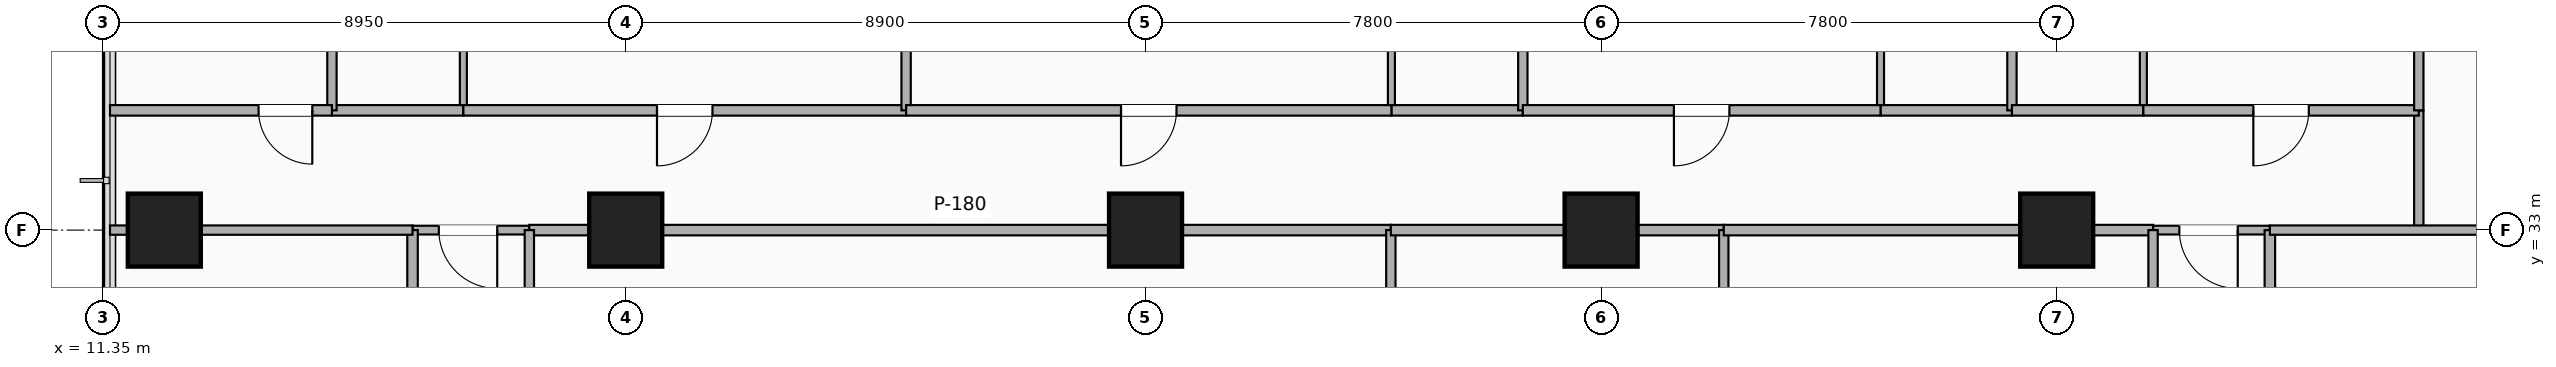
"""IFC4 building model, lengths in metres.
Left out: names, types, materials, properties, quantities, classifications, styles, units other than length and angle.
Written with IfcOpenShell. Run it as: python <this file> out.ifc"""

import sys

from ifc_helpers import new_model, si_unit, direction, frame, frame_2d, origin, origin_2d, place, context, subcontext, project, spatial, rectangle, extrude, element, fill, save


model = new_model("IFC4")
c1 = context("Model", 3, precision=1e-05, world=origin(), true_north=direction((0.0, 1.0)))
c2 = subcontext(c1, "Body", "Model", "MODEL_VIEW")
j1 = project(units=[si_unit("LENGTHUNIT", "METRE"), si_unit("PLANEANGLEUNIT", "RADIAN")], contexts=[c1])
p1 = place(None, origin())
s1 = spatial("IfcSite", under=j1, at=p1, CompositionType="ELEMENT")
p2 = place(p1, origin())
s2 = spatial("IfcBuilding", under=s1, at=p2, CompositionType="ELEMENT")
p3 = place(p2, frame((0.0, 0.0, 98.7)))
s3 = spatial("IfcBuildingStorey", under=s2, at=p3, CompositionType="ELEMENT", Elevation=98.7)
for number, where, z_axis, x_axis in (
    (1, (20.3, 33.0, -0.26), (0.0, 0.0, 1.0), (1.0, 0.0, 0.0)),
    (2, (29.2, 33.0, -0.26), (0.0, 0.0, 1.0), (1.0, 0.0, 0.0)),
    (3, (37.0, 33.0, -0.26), (0.0, 0.0, 1.0), (1.0, 0.0, 0.0)),
    (4, (44.8, 33.0, -0.26), (0.0, 0.0, 1.0), (1.0, 0.0, 0.0)),
    (5, (12.4, 33.0, -0.26), (0.0, 0.0, 1.0), (1.0, 0.0, 0.0)),
):
    element("IfcColumn", number, at=place(p3, frame(where, z_axis=z_axis, x_axis=x_axis)), inside=s3, PredefinedType="COLUMN", context=c2, shape_type="SweptSolid", body=[
        extrude(rectangle(XDim=1.25, YDim=1.25, at=origin_2d()), origin(), (0.0, 0.0, 1.0), 3.5),
    ])
p4 = place(p3, frame((16.65, 33.0, 0.0), z_axis=(0.0, 0.0, 1.0), x_axis=(1.0, 0.0, 0.0)))
e6 = element("IfcWall", 6, at=p4, inside=s3, PredefinedType="PARTITIONING", context=c2, shape_type="SweptSolid", body=[
    extrude(rectangle(XDim=2.0, YDim=0.15, at=frame_2d((1.0, 0.0))), origin(), (0.0, 0.0, 1.0), 2.313),
])
p5 = place(p4, frame((0.45, 0.0, 0.0)))
e7 = element("IfcOpeningElement", 7, at=p5, cuts=e6, PredefinedType="OPENING", context=c2, shape_type="SweptSolid", body=[
    extrude(rectangle(XDim=1.0, YDim=2.15, at=frame_2d((0.5, 1.075))), frame((0.0, 0.085, 0.0), z_axis=(0.0, -1.0, 0.0), x_axis=(1.0, 0.0, 0.0)), (0.0, 0.0, 1.0), 0.17),
])
p6 = place(p3, frame((46.45, 33.0, 0.0), z_axis=(0.0, 0.0, 1.0), x_axis=(1.0, 0.0, 0.0)))
e8 = element("IfcWall", 8, at=p6, inside=s3, PredefinedType="PARTITIONING", context=c2, shape_type="SweptSolid", body=[
    extrude(rectangle(XDim=2.0, YDim=0.15, at=frame_2d((1.0, 0.0))), origin(), (0.0, 0.0, 1.0), 2.313),
])
p7 = place(p6, frame((0.45, 0.0, 0.0)))
e9 = element("IfcOpeningElement", 9, at=p7, cuts=e8, PredefinedType="OPENING", context=c2, shape_type="SweptSolid", body=[
    extrude(rectangle(XDim=1.0, YDim=2.15, at=frame_2d((0.5, 1.075))), frame((0.0, 0.085, 0.0), z_axis=(0.0, -1.0, 0.0), x_axis=(1.0, 0.0, 0.0)), (0.0, 0.0, 1.0), 0.17),
])
p8 = place(p3, frame((51.0, 33.0, 0.0), z_axis=(0.0, 0.0, 1.0), x_axis=(0.0, 1.0, 0.0)))
e10 = element("IfcWall", 10, at=p8, inside=s3, PredefinedType="PARTITIONING", context=c2, shape_type="SweptSolid", body=[
    extrude(rectangle(XDim=2.05, YDim=0.16, at=frame_2d((1.025, 0.0))), origin(), (0.0, 0.0, 1.0), 2.313),
])
p9 = place(p3, frame((18.65, 33.0, 0.0), z_axis=(0.0, 0.0, 1.0), x_axis=(1.0, 0.0, 0.0)))
e11 = element("IfcWall", 11, at=p9, inside=s3, PredefinedType="PARTITIONING", context=c2, shape_type="SweptSolid", body=[
    extrude(rectangle(XDim=14.75, YDim=0.18, at=frame_2d((7.375, 0.0))), origin(), (0.0, 0.0, 1.0), 2.313),
])
p10 = place(p3, frame((18.65, 22.65, 0.0), z_axis=(0.0, 0.0, 1.0), x_axis=(0.0, 1.0, 0.0)))
e12 = element("IfcWall", 12, at=p10, inside=s3, PredefinedType="PARTITIONING", context=c2, shape_type="SweptSolid", body=[
    extrude(rectangle(XDim=10.35, YDim=0.16, at=frame_2d((5.175, 0.0))), origin(), (0.0, 0.0, 1.0), 2.313),
])
p11 = place(p3, frame((33.4, 22.65, 0.0), z_axis=(0.0, 0.0, 1.0), x_axis=(0.0, 1.0, 0.0)))
e13 = element("IfcWall", 13, at=p11, inside=s3, PredefinedType="PARTITIONING", context=c2, shape_type="SweptSolid", body=[
    extrude(rectangle(XDim=10.35, YDim=0.16, at=frame_2d((5.175, 0.0))), origin(), (0.0, 0.0, 1.0), 2.614),
])
p12 = place(p3, frame((33.4, 33.0, 0.0), z_axis=(0.0, 0.0, 1.0), x_axis=(1.0, 0.0, 0.0)))
e14 = element("IfcWall", 14, at=p12, inside=s3, PredefinedType="PARTITIONING", context=c2, shape_type="SweptSolid", body=[
    extrude(rectangle(XDim=5.7, YDim=0.18, at=frame_2d((2.85, 0.0))), origin(), (0.0, 0.0, 1.0), 2.313),
])
p13 = place(p3, frame((39.1, 22.65, 0.0), z_axis=(0.0, 0.0, 1.0), x_axis=(0.0, 1.0, 0.0)))
e15 = element("IfcWall", 15, at=p13, inside=s3, PredefinedType="PARTITIONING", context=c2, shape_type="SweptSolid", body=[
    extrude(rectangle(XDim=10.35, YDim=0.16, at=frame_2d((5.175, 0.0))), origin(), (0.0, 0.0, 1.0), 2.614),
])
p14 = place(p3, frame((39.1, 33.0, 0.0), z_axis=(0.0, 0.0, 1.0), x_axis=(1.0, 0.0, 0.0)))
e16 = element("IfcWall", 16, at=p14, inside=s3, PredefinedType="PARTITIONING", context=c2, shape_type="SweptSolid", body=[
    extrude(rectangle(XDim=7.35, YDim=0.18, at=frame_2d((3.675, 0.0))), origin(), (0.0, 0.0, 1.0), 2.313),
])
p15 = place(p3, frame((46.45, 22.65, 0.0), z_axis=(0.0, 0.0, 1.0), x_axis=(0.0, 1.0, 0.0)))
e17 = element("IfcWall", 17, at=p15, inside=s3, PredefinedType="PARTITIONING", context=c2, shape_type="SweptSolid", body=[
    extrude(rectangle(XDim=10.35, YDim=0.16, at=frame_2d((5.175, 0.0))), origin(), (0.0, 0.0, 1.0), 2.313),
])
p16 = place(p3, frame((17.52, 35.05, 0.0), z_axis=(0.0, 0.0, 1.0), x_axis=(0.0, 1.0, 0.0)))
e18 = element("IfcWall", 18, at=p16, inside=s3, PredefinedType="PARTITIONING", context=c2, shape_type="SweptSolid", body=[
    extrude(rectangle(XDim=2.35, YDim=0.12, at=frame_2d((1.175, 0.0))), origin(), (0.0, 0.0, 1.0), 3.24),
])
p17 = place(p3, frame((15.27, 35.05, 0.0), z_axis=(0.0, 0.0, 1.0), x_axis=(1.0, 0.0, 0.0)))
e19 = element("IfcWall", 19, at=p17, inside=s3, PredefinedType="PARTITIONING", context=c2, shape_type="SweptSolid", body=[
    extrude(rectangle(XDim=2.25, YDim=0.18, at=frame_2d((1.125, 0.0))), origin(), (0.0, 0.0, 1.0), 3.24),
])
p18 = place(p3, frame((17.52, 35.05, 0.0), z_axis=(0.0, 0.0, 1.0), x_axis=(1.0, 0.0, 0.0)))
e20 = element("IfcWall", 20, at=p18, inside=s3, PredefinedType="PARTITIONING", context=c2, shape_type="SweptSolid", body=[
    extrude(rectangle(XDim=7.581, YDim=0.18, at=frame_2d((3.79, 0.0))), origin(), (0.0, 0.0, 1.0), 2.313),
])
p19 = place(p18, frame((3.315, 0.0, 0.0)))
e21 = element("IfcOpeningElement", 21, at=p19, cuts=e20, PredefinedType="OPENING", context=c2, shape_type="SweptSolid", body=[
    extrude(rectangle(XDim=0.95, YDim=2.15, at=frame_2d((0.475, 1.075))), frame((0.0, 0.1, 0.0), z_axis=(0.0, -1.0, 0.0), x_axis=(1.0, 0.0, 0.0)), (0.0, 0.0, 1.0), 0.2),
])
p20 = place(p3, frame((15.27, 35.05, 0.0), z_axis=(0.0, 0.0, 1.0), x_axis=(0.0, 1.0, 0.0)))
e22 = element("IfcWall", 22, at=p20, inside=s3, PredefinedType="PARTITIONING", context=c2, shape_type="SweptSolid", body=[
    extrude(rectangle(XDim=7.53, YDim=0.16, at=frame_2d((3.765, 0.0))), origin(), (0.0, 0.0, 1.0), 3.24),
])
p21 = place(p3, frame((25.101, 35.05, 0.0), z_axis=(0.0, 0.0, 1.0), x_axis=(0.0, 1.0, 0.0)))
e23 = element("IfcWall", 23, at=p21, inside=s3, PredefinedType="PARTITIONING", context=c2, shape_type="SweptSolid", body=[
    extrude(rectangle(XDim=11.33, YDim=0.16, at=frame_2d((5.665, 0.0))), origin(), (0.0, 0.0, 1.0), 2.603),
])
p22 = place(p3, frame((33.41, 35.05, 0.0), z_axis=(0.0, 0.0, 1.0), x_axis=(0.0, 1.0, 0.0)))
e24 = element("IfcWall", 24, at=p22, inside=s3, PredefinedType="PARTITIONING", context=c2, shape_type="SweptSolid", body=[
    extrude(rectangle(XDim=2.35, YDim=0.12, at=frame_2d((1.175, 0.0))), origin(), (0.0, 0.0, 1.0), 2.922),
])
p23 = place(p3, frame((33.41, 35.05, 0.0), z_axis=(0.0, 0.0, 1.0), x_axis=(1.0, 0.0, 0.0)))
e25 = element("IfcWall", 25, at=p23, inside=s3, PredefinedType="PARTITIONING", context=c2, shape_type="SweptSolid", body=[
    extrude(rectangle(XDim=2.25, YDim=0.18, at=frame_2d((1.125, 0.0))), origin(), (0.0, 0.0, 1.0), 3.24),
])
p24 = place(p3, frame((25.101, 35.05, 0.0), z_axis=(0.0, 0.0, 1.0), x_axis=(1.0, 0.0, 0.0)))
e26 = element("IfcWall", 26, at=p24, inside=s3, PredefinedType="PARTITIONING", context=c2, shape_type="SweptSolid", body=[
    extrude(rectangle(XDim=8.309, YDim=0.18, at=frame_2d((4.155, 0.0))), origin(), (0.0, 0.0, 1.0), 2.313),
])
p25 = place(p24, frame((3.679, 0.0, 0.0)))
e27 = element("IfcOpeningElement", 27, at=p25, cuts=e26, PredefinedType="OPENING", context=c2, shape_type="SweptSolid", body=[
    extrude(rectangle(XDim=0.95, YDim=2.15, at=frame_2d((0.475, 1.075))), frame((0.0, 0.1, 0.0), z_axis=(0.0, -1.0, 0.0), x_axis=(1.0, 0.0, 0.0)), (0.0, 0.0, 1.0), 0.2),
])
p26 = place(p3, frame((35.66, 35.05, 0.0), z_axis=(0.0, 0.0, 1.0), x_axis=(0.0, 1.0, 0.0)))
e28 = element("IfcWall", 28, at=p26, inside=s3, PredefinedType="PARTITIONING", context=c2, shape_type="SweptSolid", body=[
    extrude(rectangle(XDim=11.33, YDim=0.16, at=frame_2d((5.665, 0.0))), origin(), (0.0, 0.0, 1.0), 2.603),
])
p27 = place(p3, frame((41.784, 35.05, 0.0), z_axis=(0.0, 0.0, 1.0), x_axis=(0.0, 1.0, 0.0)))
e29 = element("IfcWall", 29, at=p27, inside=s3, PredefinedType="PARTITIONING", context=c2, shape_type="SweptSolid", body=[
    extrude(rectangle(XDim=2.35, YDim=0.12, at=frame_2d((1.175, 0.0))), origin(), (0.0, 0.0, 1.0), 2.922),
])
p28 = place(p3, frame((41.784, 35.05, 0.0), z_axis=(0.0, 0.0, 1.0), x_axis=(1.0, 0.0, 0.0)))
e30 = element("IfcWall", 30, at=p28, inside=s3, PredefinedType="PARTITIONING", context=c2, shape_type="SweptSolid", body=[
    extrude(rectangle(XDim=2.25, YDim=0.18, at=frame_2d((1.125, 0.0))), origin(), (0.0, 0.0, 1.0), 3.24),
])
p29 = place(p3, frame((35.66, 35.05, 0.0), z_axis=(0.0, 0.0, 1.0), x_axis=(1.0, 0.0, 0.0)))
e31 = element("IfcWall", 31, at=p29, inside=s3, PredefinedType="PARTITIONING", context=c2, shape_type="SweptSolid", body=[
    extrude(rectangle(XDim=6.124, YDim=0.18, at=frame_2d((3.062, 0.0))), origin(), (0.0, 0.0, 1.0), 2.313),
])
p30 = place(p29, frame((2.587, 0.0, 0.0)))
e32 = element("IfcOpeningElement", 32, at=p30, cuts=e31, PredefinedType="OPENING", context=c2, shape_type="SweptSolid", body=[
    extrude(rectangle(XDim=0.95, YDim=2.15, at=frame_2d((0.475, 1.075))), frame((0.0, 0.1, 0.0), z_axis=(0.0, -1.0, 0.0), x_axis=(1.0, 0.0, 0.0)), (0.0, 0.0, 1.0), 0.2),
])
p31 = place(p3, frame((44.034, 35.05, 0.0), z_axis=(0.0, 0.0, 1.0), x_axis=(0.0, 1.0, 0.0)))
e33 = element("IfcWall", 33, at=p31, inside=s3, PredefinedType="PARTITIONING", context=c2, shape_type="SweptSolid", body=[
    extrude(rectangle(XDim=11.33, YDim=0.16, at=frame_2d((5.665, 0.0))), origin(), (0.0, 0.0, 1.0), 2.603),
])
p32 = place(p3, frame((46.284, 35.05, 0.0), z_axis=(0.0, 0.0, 1.0), x_axis=(0.0, 1.0, 0.0)))
e34 = element("IfcWall", 34, at=p32, inside=s3, PredefinedType="PARTITIONING", context=c2, shape_type="SweptSolid", body=[
    extrude(rectangle(XDim=2.35, YDim=0.12, at=frame_2d((1.175, 0.0))), origin(), (0.0, 0.0, 1.0), 3.24),
])
p33 = place(p3, frame((44.034, 35.05, 0.0), z_axis=(0.0, 0.0, 1.0), x_axis=(1.0, 0.0, 0.0)))
e35 = element("IfcWall", 35, at=p33, inside=s3, PredefinedType="PARTITIONING", context=c2, shape_type="SweptSolid", body=[
    extrude(rectangle(XDim=2.25, YDim=0.18, at=frame_2d((1.125, 0.0))), origin(), (0.0, 0.0, 1.0), 2.313),
])
p34 = place(p3, frame((46.284, 35.05, 0.0), z_axis=(0.0, 0.0, 1.0), x_axis=(1.0, 0.0, 0.0)))
e36 = element("IfcWall", 36, at=p34, inside=s3, PredefinedType="PARTITIONING", context=c2, shape_type="SweptSolid", body=[
    extrude(rectangle(XDim=4.716, YDim=0.18, at=frame_2d((2.358, 0.0))), origin(), (0.0, 0.0, 1.0), 3.24),
])
p35 = place(p34, frame((1.883, 0.0, 0.0)))
e37 = element("IfcOpeningElement", 37, at=p35, cuts=e36, PredefinedType="OPENING", context=c2, shape_type="SweptSolid", body=[
    extrude(rectangle(XDim=0.95, YDim=2.15, at=frame_2d((0.475, 1.075))), frame((0.0, 0.1, 0.0), z_axis=(0.0, -1.0, 0.0), x_axis=(1.0, 0.0, 0.0)), (0.0, 0.0, 1.0), 0.2),
])
p36 = place(p3, frame((51.0, 35.05, 0.0), z_axis=(0.0, 0.0, 1.0), x_axis=(0.0, 1.0, 0.0)))
e38 = element("IfcWall", 38, at=p36, inside=s3, PredefinedType="PARTITIONING", context=c2, shape_type="SweptSolid", body=[
    extrude(rectangle(XDim=11.33, YDim=0.16, at=frame_2d((5.665, 0.0))), origin(), (0.0, 0.0, 1.0), 3.24),
])
p37 = place(p3, frame((16.65, 29.22, 0.0), z_axis=(0.0, 0.0, 1.0), x_axis=(0.0, 1.0, 0.0)))
e39 = element("IfcWall", 39, at=p37, inside=s3, PredefinedType="PARTITIONING", context=c2, shape_type="SweptSolid", body=[
    extrude(rectangle(XDim=3.78, YDim=0.18, at=frame_2d((1.89, 0.0))), origin(), (0.0, 0.0, 1.0), 2.313),
])
p38 = place(p37, frame((1.415, 0.0, 0.0)))
e40 = element("IfcOpeningElement", 40, at=p38, cuts=e39, PredefinedType="OPENING", context=c2, shape_type="SweptSolid", body=[
    extrude(rectangle(XDim=0.95, YDim=2.15, at=frame_2d((0.475, 1.075))), frame((0.0, 0.1, 0.0), z_axis=(0.0, -1.0, 0.0), x_axis=(1.0, 0.0, 0.0)), (0.0, 0.0, 1.0), 0.2),
])
p39 = place(p3, frame((11.47, 33.0, 0.0), z_axis=(0.0, 0.0, 1.0), x_axis=(1.0, 0.0, 0.0)))
e41 = element("IfcWall", 41, at=p39, inside=s3, PredefinedType="PARTITIONING", context=c2, shape_type="SweptSolid", body=[
    extrude(rectangle(XDim=5.18, YDim=0.16, at=frame_2d((2.59, 0.0))), origin(), (0.0, 0.0, 1.0), 2.313),
])
p40 = place(p3, frame((48.45, 25.55, 0.0), z_axis=(0.0, 0.0, 1.0), x_axis=(0.0, 1.0, 0.0)))
e42 = element("IfcWall", 42, at=p40, inside=s3, PredefinedType="PARTITIONING", context=c2, shape_type="SweptSolid", body=[
    extrude(rectangle(XDim=7.45, YDim=0.18, at=frame_2d((3.725, 0.0))), origin(), (0.0, 0.0, 1.0), 2.313),
])
p41 = place(p40, frame((4.2, 0.0, 0.0), z_axis=(0.0, 0.0, 1.0), x_axis=(-1.0, 0.0, 0.0)))
e43 = element("IfcOpeningElement", 43, at=p41, cuts=e42, PredefinedType="OPENING", context=c2, shape_type="SweptSolid", body=[
    extrude(rectangle(XDim=0.95, YDim=2.15, at=frame_2d((0.475, 1.075))), frame((0.0, 0.1, 0.0), z_axis=(0.0, -1.0, 0.0), x_axis=(1.0, 0.0, 0.0)), (0.0, 0.0, 1.0), 0.2),
])
p42 = place(p3, frame((48.45, 33.0, 0.0), z_axis=(0.0, 0.0, 1.0), x_axis=(1.0, 0.0, 0.0)))
e44 = element("IfcWall", 44, at=p42, inside=s3, PredefinedType="PARTITIONING", context=c2, shape_type="SweptSolid", body=[
    extrude(rectangle(XDim=10.43, YDim=0.16, at=frame_2d((5.215, 0.0))), origin(), (0.0, 0.0, 1.0), 2.313),
])
p43 = place(p3, frame((11.47, 35.05, 0.0), z_axis=(0.0, 0.0, 1.0), x_axis=(1.0, 0.0, 0.0)))
e45 = element("IfcWall", 45, at=p43, inside=s3, PredefinedType="PARTITIONING", context=c2, shape_type="SweptSolid", body=[
    extrude(rectangle(XDim=3.8, YDim=0.18, at=frame_2d((1.9, 0.0))), origin(), (0.0, 0.0, 1.0), 3.24),
])
p44 = place(p43, frame((2.544, 0.0, 0.0)))
e46 = element("IfcOpeningElement", 46, at=p44, cuts=e45, PredefinedType="OPENING", context=c2, shape_type="SweptSolid", body=[
    extrude(rectangle(XDim=0.92, YDim=2.08, at=frame_2d((0.46, 1.04))), frame((0.0, 0.1, 0.0), z_axis=(0.0, -1.0, 0.0), x_axis=(1.0, 0.0, 0.0)), (0.0, 0.0, 1.0), 0.2),
])
p45 = place(p5, origin())
e47 = element("IfcDoor", 47, at=p45, inside=s3, OperationType="SINGLE_SWING_RIGHT", PredefinedType="DOOR", context=c2, shape_type="SweptSolid", body=[
    extrude(rectangle(XDim=1.0, YDim=2.15, at=frame_2d((0.5, 1.075))), frame((0.0, 0.025, 0.0), z_axis=(0.0, -1.0, 0.0), x_axis=(1.0, 0.0, 0.0)), (0.0, 0.0, 1.0), 0.05),
])
fill(e7, e47)
p46 = place(p7, origin())
e48 = element("IfcDoor", 48, at=p46, inside=s3, OperationType="SINGLE_SWING_RIGHT", PredefinedType="DOOR", context=c2, shape_type="SweptSolid", body=[
    extrude(rectangle(XDim=1.0, YDim=2.15, at=frame_2d((0.5, 1.075))), frame((0.0, 0.025, 0.0), z_axis=(0.0, -1.0, 0.0), x_axis=(1.0, 0.0, 0.0)), (0.0, 0.0, 1.0), 0.05),
])
fill(e9, e48)
p47 = place(p19, origin())
e49 = element("IfcDoor", 49, at=p47, inside=s3, OperationType="SINGLE_SWING_LEFT", PredefinedType="DOOR", context=c2, shape_type="SweptSolid", body=[
    extrude(rectangle(XDim=0.95, YDim=2.15, at=frame_2d((0.475, 1.075))), frame((0.0, 0.025, 0.0), z_axis=(0.0, -1.0, 0.0), x_axis=(1.0, 0.0, 0.0)), (0.0, 0.0, 1.0), 0.05),
])
fill(e21, e49)
p48 = place(p25, origin())
e50 = element("IfcDoor", 50, at=p48, inside=s3, OperationType="SINGLE_SWING_LEFT", PredefinedType="DOOR", context=c2, shape_type="SweptSolid", body=[
    extrude(rectangle(XDim=0.95, YDim=2.15, at=frame_2d((0.475, 1.075))), frame((0.0, 0.025, 0.0), z_axis=(0.0, -1.0, 0.0), x_axis=(1.0, 0.0, 0.0)), (0.0, 0.0, 1.0), 0.05),
])
fill(e27, e50)
p49 = place(p30, origin())
e51 = element("IfcDoor", 51, at=p49, inside=s3, OperationType="SINGLE_SWING_LEFT", PredefinedType="DOOR", context=c2, shape_type="SweptSolid", body=[
    extrude(rectangle(XDim=0.95, YDim=2.15, at=frame_2d((0.475, 1.075))), frame((0.0, 0.025, 0.0), z_axis=(0.0, -1.0, 0.0), x_axis=(1.0, 0.0, 0.0)), (0.0, 0.0, 1.0), 0.05),
])
fill(e32, e51)
p50 = place(p35, origin())
e52 = element("IfcDoor", 52, at=p50, inside=s3, OperationType="SINGLE_SWING_LEFT", PredefinedType="DOOR", context=c2, shape_type="SweptSolid", body=[
    extrude(rectangle(XDim=0.95, YDim=2.15, at=frame_2d((0.475, 1.075))), frame((0.0, 0.025, 0.0), z_axis=(0.0, -1.0, 0.0), x_axis=(1.0, 0.0, 0.0)), (0.0, 0.0, 1.0), 0.05),
])
fill(e37, e52)
p51 = place(p44, origin())
e53 = element("IfcDoor", 53, at=p51, inside=s3, OperationType="SINGLE_SWING_RIGHT", PredefinedType="DOOR", context=c2, shape_type="SweptSolid", body=[
    extrude(rectangle(XDim=0.92, YDim=2.08, at=frame_2d((0.46, 1.04))), frame((0.0, 0.025, 0.0), z_axis=(0.0, -1.0, 0.0), x_axis=(1.0, 0.0, 0.0)), (0.0, 0.0, 1.0), 0.05),
])
fill(e46, e53)
save(model, sys.argv[1])
